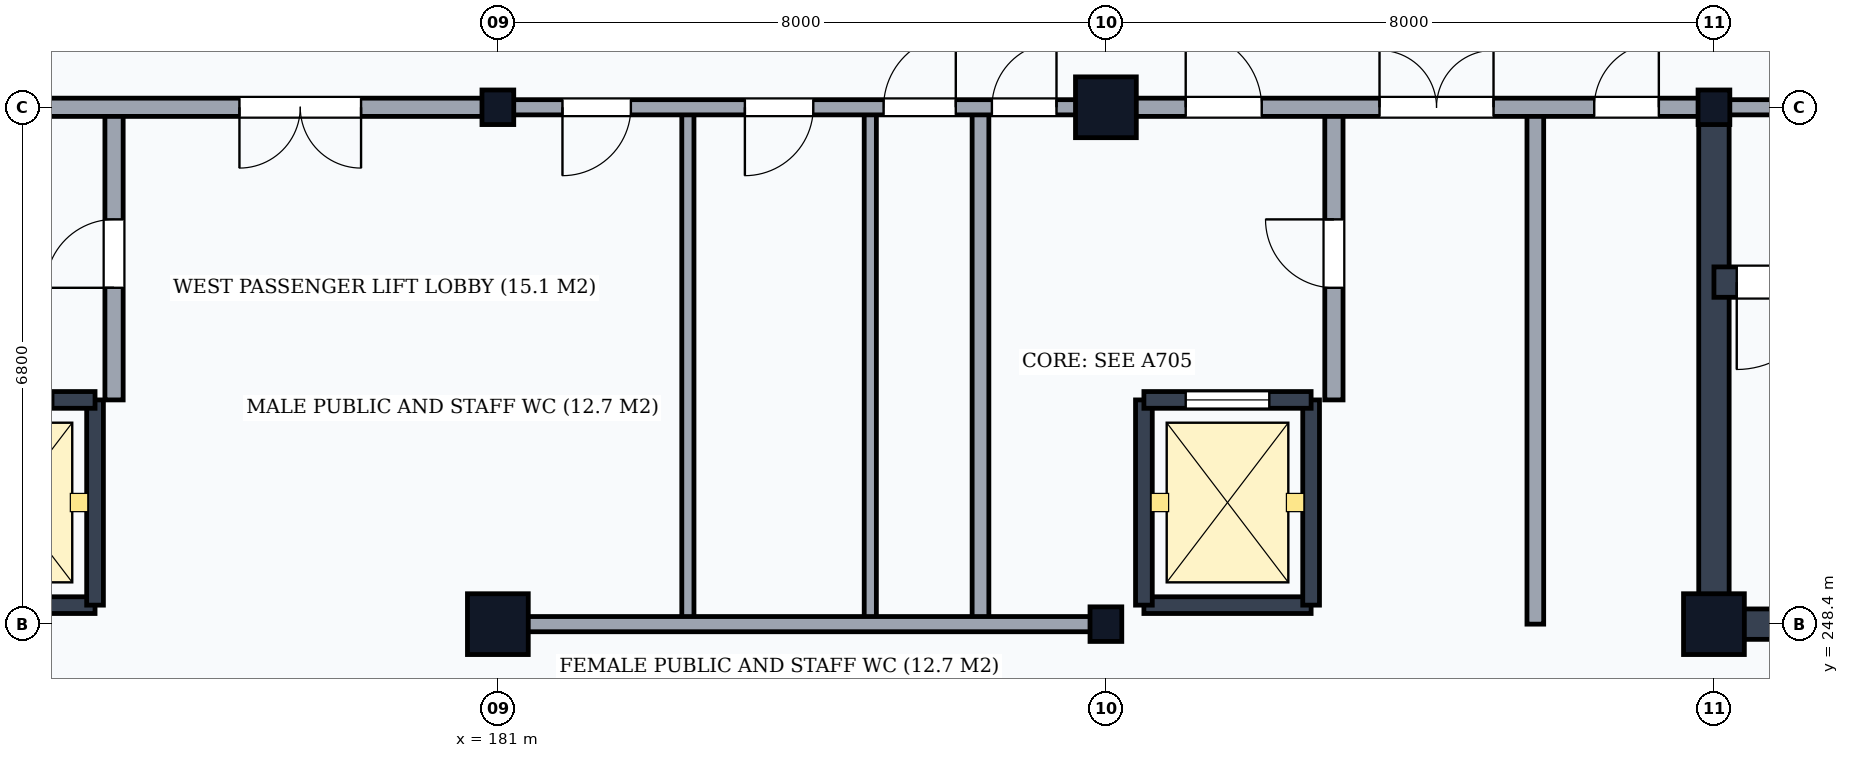
"""IFC4 building model, lengths in metres.
Left out: names, types, materials, properties, quantities, classifications, styles, units other than length and angle.
Written with IfcOpenShell. Run it as: python <this file> out.ifc"""

import sys

from ifc_helpers import new_model, si_unit, direction, frame, frame_2d, origin, origin_2d, place, context, subcontext, project, spatial, rectangle, i_section, extrude, element, fill, save


model = new_model("IFC4")
c1 = context("Model", 3, precision=1e-05, world=origin(), true_north=direction((0.0, 1.0)))
c2 = subcontext(c1, "Body", "Model", "MODEL_VIEW")
j1 = project(units=[si_unit("LENGTHUNIT", "METRE"), si_unit("PLANEANGLEUNIT", "RADIAN")], contexts=[c1])
p1 = place(None, origin())
s1 = spatial("IfcSite", under=j1, at=p1, CompositionType="ELEMENT")
p2 = place(p1, origin())
s2 = spatial("IfcBuilding", under=s1, at=p2, CompositionType="ELEMENT")
p3 = place(p2, frame((0.0, 0.0, -4.8)))
s3 = spatial("IfcBuildingStorey", under=s2, at=p3, CompositionType="ELEMENT", Elevation=-4.8)
p4 = place(p3, frame((181.0, 248.4, 0.0), z_axis=(0.0, 0.0, 1.0), x_axis=(1.0, 0.0, 0.0)))
e1 = element("IfcColumn", 1, at=p4, inside=s3, PredefinedType="COLUMN", context=c2, shape_type="SweptSolid", body=[
    extrude(rectangle(XDim=0.8, YDim=0.8, at=origin_2d()), origin(), (0.0, 0.0, 1.0), 4.8),
])
for number, where, z_axis, x_axis in (
    (2, (181.0, 255.2, 0.0), (0.0, 0.0, 1.0), (1.0, 0.0, 0.0)),
    (3, (189.0, 248.4, 0.0), (0.0, 0.0, 1.0), (1.0, 0.0, 0.0)),
):
    element("IfcColumn", number, at=place(p3, frame(where, z_axis=z_axis, x_axis=x_axis)), inside=s3, PredefinedType="COLUMN", context=c2, shape_type="SweptSolid", body=[
        extrude(i_section(OverallWidth=0.418, OverallDepth=0.455, WebThickness=0.042, FlangeThickness=0.068, FilletRadius=0.015, at=origin_2d()), origin(), (0.0, 0.0, 1.0), 4.8),
    ])
for number, where, z_axis, x_axis in (
    (4, (189.0, 255.2, 0.0), (0.0, 0.0, 1.0), (1.0, 0.0, 0.0)),
    (5, (197.0, 248.4, 0.0), (0.0, 0.0, 1.0), (1.0, 0.0, 0.0)),
):
    element("IfcColumn", number, at=place(p3, frame(where, z_axis=z_axis, x_axis=x_axis)), inside=s3, PredefinedType="COLUMN", context=c2, shape_type="SweptSolid", body=[
        extrude(rectangle(XDim=0.8, YDim=0.8, at=origin_2d()), origin(), (0.0, 0.0, 1.0), 4.8),
    ])
p5 = place(p3, frame((197.0, 255.2, 0.0), z_axis=(0.0, 0.0, 1.0), x_axis=(1.0, 0.0, 0.0)))
e6 = element("IfcColumn", 6, at=p5, inside=s3, PredefinedType="COLUMN", context=c2, shape_type="SweptSolid", body=[
    extrude(i_section(OverallWidth=0.418, OverallDepth=0.455, WebThickness=0.042, FlangeThickness=0.068, FilletRadius=0.015, at=origin_2d()), origin(), (0.0, 0.0, 1.0), 4.8),
])
p6 = place(p3, frame((197.0, 248.4, 0.0), z_axis=(0.0, 0.0, 1.0), x_axis=(1.0, 0.0, 0.0)))
e7 = element("IfcWall", 7, at=p6, inside=s3, PredefinedType="SHEAR", context=c2, shape_type="SweptSolid", body=[
    extrude(rectangle(XDim=8.0, YDim=0.4, at=frame_2d((4.0, 0.0))), origin(), (0.0, 0.0, 1.0), 4.51),
])
p7 = place(p3, frame((197.0, 248.4, 0.0), z_axis=(0.0, 0.0, 1.0), x_axis=(0.0, 1.0, 0.0)))
e8 = element("IfcWall", 8, at=p7, inside=s3, PredefinedType="SHEAR", context=c2, shape_type="SweptSolid", body=[
    extrude(rectangle(XDim=6.8, YDim=0.4, at=frame_2d((3.4, 0.0))), origin(), (0.0, 0.0, 1.0), 4.51),
])
p8 = place(p3, frame((197.0, 252.9, 0.0), z_axis=(0.0, 0.0, 1.0), x_axis=(1.0, 0.0, 0.0)))
e9 = element("IfcWall", 9, at=p8, inside=s3, PredefinedType="SHEAR", context=c2, shape_type="SweptSolid", body=[
    extrude(rectangle(XDim=8.0, YDim=0.4, at=frame_2d((4.0, 0.0))), origin(), (0.0, 0.0, 1.0), 4.51),
])
p9 = place(p8, frame((0.3, 0.0, 0.0)))
e10 = element("IfcOpeningElement", 10, at=p9, cuts=e9, PredefinedType="OPENING", context=c2, shape_type="SweptSolid", body=[
    extrude(rectangle(XDim=1.15, YDim=2.15, at=frame_2d((0.575, 1.075))), frame((0.0, 0.215, 0.0), z_axis=(0.0, -1.0, 0.0), x_axis=(1.0, 0.0, 0.0)), (0.0, 0.0, 1.0), 0.43),
])
p10 = place(p3, frame((197.0, 255.2, 0.0), z_axis=(0.0, 0.0, 1.0), x_axis=(1.0, 0.0, 0.0)))
e11 = element("IfcWall", 11, at=p10, inside=s3, PredefinedType="PARTITIONING", context=c2, shape_type="SweptSolid", body=[
    extrude(rectangle(XDim=8.0, YDim=0.2, at=frame_2d((4.0, 0.0))), origin(), (0.0, 0.0, 1.0), 3.858),
])
p11 = place(p10, frame((3.275, 0.0, 0.0)))
e12 = element("IfcOpeningElement", 12, at=p11, cuts=e11, PredefinedType="OPENING", context=c2, shape_type="SweptSolid", body=[
    extrude(rectangle(XDim=1.45, YDim=2.2, at=frame_2d((0.725, 1.1))), frame((0.0, 0.115, 0.0), z_axis=(0.0, -1.0, 0.0), x_axis=(1.0, 0.0, 0.0)), (0.0, 0.0, 1.0), 0.23),
])
p12 = place(p3, frame((173.5, 248.65, 0.0), z_axis=(0.0, 0.0, 1.0), x_axis=(1.0, 0.0, 0.0)))
e13 = element("IfcWall", 13, at=p12, inside=s3, PredefinedType="SHEAR", context=c2, shape_type="SweptSolid", body=[
    extrude(rectangle(XDim=2.2, YDim=0.22, at=frame_2d((1.1, 0.0))), origin(), (0.0, 0.0, 1.0), 4.51),
])
p13 = place(p3, frame((175.7, 248.65, 0.0), z_axis=(0.0, 0.0, 1.0), x_axis=(0.0, 1.0, 0.0)))
e14 = element("IfcWall", 14, at=p13, inside=s3, PredefinedType="SHEAR", context=c2, shape_type="SweptSolid", body=[
    extrude(rectangle(XDim=2.7, YDim=0.22, at=frame_2d((1.35, 0.0))), origin(), (0.0, 0.0, 1.0), 4.51),
])
p14 = place(p3, frame((173.5, 251.35, 0.0), z_axis=(0.0, 0.0, 1.0), x_axis=(1.0, 0.0, 0.0)))
e15 = element("IfcWall", 15, at=p14, inside=s3, PredefinedType="SHEAR", context=c2, shape_type="SweptSolid", body=[
    extrude(rectangle(XDim=2.2, YDim=0.22, at=frame_2d((1.1, 0.0))), origin(), (0.0, 0.0, 1.0), 4.51),
])
p15 = place(p14, frame((0.55, 0.0, 0.0)))
e16 = element("IfcOpeningElement", 16, at=p15, cuts=e15, PredefinedType="OPENING", context=c2, shape_type="SweptSolid", body=[
    extrude(rectangle(XDim=1.1, YDim=2.15, at=frame_2d((0.55, 1.075))), frame((0.0, 0.125, 0.0), z_axis=(0.0, -1.0, 0.0), x_axis=(1.0, 0.0, 0.0)), (0.0, 0.0, 1.0), 0.25),
])
p16 = place(p3, frame((189.5, 248.65, 0.0), z_axis=(0.0, 0.0, 1.0), x_axis=(1.0, 0.0, 0.0)))
e17 = element("IfcWall", 17, at=p16, inside=s3, PredefinedType="SHEAR", context=c2, shape_type="SweptSolid", body=[
    extrude(rectangle(XDim=2.2, YDim=0.22, at=frame_2d((1.1, 0.0))), origin(), (0.0, 0.0, 1.0), 4.51),
])
for number, where, z_axis, x_axis in (
    (18, (189.5, 248.65, 0.0), (0.0, 0.0, 1.0), (0.0, 1.0, 0.0)),
    (19, (191.7, 248.65, 0.0), (0.0, 0.0, 1.0), (0.0, 1.0, 0.0)),
):
    element("IfcWall", number, at=place(p3, frame(where, z_axis=z_axis, x_axis=x_axis)), inside=s3, PredefinedType="SHEAR", context=c2, shape_type="SweptSolid", body=[
        extrude(rectangle(XDim=2.7, YDim=0.22, at=frame_2d((1.35, 0.0))), origin(), (0.0, 0.0, 1.0), 4.51),
    ])
p17 = place(p3, frame((189.5, 251.35, 0.0), z_axis=(0.0, 0.0, 1.0), x_axis=(1.0, 0.0, 0.0)))
e20 = element("IfcWall", 20, at=p17, inside=s3, PredefinedType="SHEAR", context=c2, shape_type="SweptSolid", body=[
    extrude(rectangle(XDim=2.2, YDim=0.22, at=frame_2d((1.1, 0.0))), origin(), (0.0, 0.0, 1.0), 4.51),
])
p18 = place(p17, frame((0.55, 0.0, 0.0)))
e21 = element("IfcOpeningElement", 21, at=p18, cuts=e20, PredefinedType="OPENING", context=c2, shape_type="SweptSolid", body=[
    extrude(rectangle(XDim=1.1, YDim=2.15, at=frame_2d((0.55, 1.075))), frame((0.0, 0.125, 0.0), z_axis=(0.0, -1.0, 0.0), x_axis=(1.0, 0.0, 0.0)), (0.0, 0.0, 1.0), 0.25),
])
p19 = place(p3, frame((175.95, 251.35, 0.0), z_axis=(0.0, 0.0, 1.0), x_axis=(0.0, 1.0, 0.0)))
e22 = element("IfcWall", 22, at=p19, inside=s3, PredefinedType="PARTITIONING", context=c2, shape_type="SweptSolid", body=[
    extrude(rectangle(XDim=3.85, YDim=0.24, at=frame_2d((1.925, 0.0))), origin(), (0.0, 0.0, 1.0), 4.51),
])
p20 = place(p19, frame((1.475, 0.0, 0.0)))
e23 = element("IfcOpeningElement", 23, at=p20, cuts=e22, PredefinedType="OPENING", context=c2, shape_type="SweptSolid", body=[
    extrude(rectangle(XDim=0.9, YDim=2.1, at=frame_2d((0.45, 1.05))), frame((0.0, 0.135, 0.0), z_axis=(0.0, -1.0, 0.0), x_axis=(1.0, 0.0, 0.0)), (0.0, 0.0, 1.0), 0.27),
])
p21 = place(p3, frame((192.0, 251.35, 0.0), z_axis=(0.0, 0.0, 1.0), x_axis=(0.0, 1.0, 0.0)))
e24 = element("IfcWall", 24, at=p21, inside=s3, PredefinedType="PARTITIONING", context=c2, shape_type="SweptSolid", body=[
    extrude(rectangle(XDim=3.85, YDim=0.24, at=frame_2d((1.925, 0.0))), origin(), (0.0, 0.0, 1.0), 4.51),
])
p22 = place(p21, frame((1.475, 0.0, 0.0)))
e25 = element("IfcOpeningElement", 25, at=p22, cuts=e24, PredefinedType="OPENING", context=c2, shape_type="SweptSolid", body=[
    extrude(rectangle(XDim=0.9, YDim=2.1, at=frame_2d((0.45, 1.05))), frame((0.0, 0.135, 0.0), z_axis=(0.0, -1.0, 0.0), x_axis=(1.0, 0.0, 0.0)), (0.0, 0.0, 1.0), 0.27),
])
p23 = place(p3, frame((194.65, 248.4, 0.0), z_axis=(0.0, 0.0, 1.0), x_axis=(0.0, 1.0, 0.0)))
e26 = element("IfcWall", 26, at=p23, inside=s3, PredefinedType="PARTITIONING", context=c2, shape_type="SweptSolid", body=[
    extrude(rectangle(XDim=6.8, YDim=0.22, at=frame_2d((3.4, 0.0))), origin(), (0.0, 0.0, 1.0), 4.51),
])
for number, where, z_axis, x_axis in (
    (27, (183.5, 248.4, 0.0), (0.0, 0.0, 1.0), (0.0, 1.0, 0.0)),
    (28, (185.9, 248.4, 0.0), (0.0, 0.0, 1.0), (0.0, 1.0, 0.0)),
):
    element("IfcWall", number, at=place(p3, frame(where, z_axis=z_axis, x_axis=x_axis)), inside=s3, PredefinedType="PARTITIONING", context=c2, shape_type="SweptSolid", body=[
        extrude(rectangle(XDim=6.8, YDim=0.16, at=frame_2d((3.4, 0.0))), origin(), (0.0, 0.0, 1.0), 4.51),
    ])
p24 = place(p3, frame((187.35, 248.4, 0.0), z_axis=(0.0, 0.0, 1.0), x_axis=(0.0, 1.0, 0.0)))
e29 = element("IfcWall", 29, at=p24, inside=s3, PredefinedType="PARTITIONING", context=c2, shape_type="SweptSolid", body=[
    extrude(rectangle(XDim=6.8, YDim=0.22, at=frame_2d((3.4, 0.0))), origin(), (0.0, 0.0, 1.0), 4.51),
])
p25 = place(p3, frame((181.0, 248.4, 0.0), z_axis=(0.0, 0.0, 1.0), x_axis=(1.0, 0.0, 0.0)))
e30 = element("IfcWall", 30, at=p25, inside=s3, PredefinedType="PARTITIONING", context=c2, shape_type="SweptSolid", body=[
    extrude(rectangle(XDim=8.0, YDim=0.2, at=frame_2d((4.0, 0.0))), origin(), (0.0, 0.0, 1.0), 3.858),
])
p26 = place(p3, frame((173.0, 255.2, 0.0), z_axis=(0.0, 0.0, 1.0), x_axis=(1.0, 0.0, 0.0)))
e31 = element("IfcWall", 31, at=p26, inside=s3, PredefinedType="PARTITIONING", context=c2, shape_type="SweptSolid", body=[
    extrude(rectangle(XDim=8.0, YDim=0.24, at=frame_2d((4.0, 0.0))), origin(), (0.0, 0.0, 1.0), 3.858),
])
p27 = place(p26, frame((1.05, 0.0, 0.0)))
e32 = element("IfcOpeningElement", 32, at=p27, cuts=e31, PredefinedType="OPENING", context=c2, shape_type="SweptSolid", body=[
    extrude(rectangle(XDim=1.0, YDim=2.1, at=frame_2d((0.5, 1.05))), frame((0.0, 0.135, 0.0), z_axis=(0.0, -1.0, 0.0), x_axis=(1.0, 0.0, 0.0)), (0.0, 0.0, 1.0), 0.27),
])
p28 = place(p26, frame((4.6, 0.0, 0.0)))
e33 = element("IfcOpeningElement", 33, at=p28, cuts=e31, PredefinedType="OPENING", context=c2, shape_type="SweptSolid", body=[
    extrude(rectangle(XDim=1.6, YDim=2.25, at=frame_2d((0.8, 1.125))), frame((0.0, 0.135, 0.0), z_axis=(0.0, -1.0, 0.0), x_axis=(1.0, 0.0, 0.0)), (0.0, 0.0, 1.0), 0.27),
])
p29 = place(p3, frame((181.0, 255.2, 0.0), z_axis=(0.0, 0.0, 1.0), x_axis=(1.0, 0.0, 0.0)))
e34 = element("IfcWall", 34, at=p29, inside=s3, PredefinedType="PARTITIONING", context=c2, shape_type="SweptSolid", body=[
    extrude(rectangle(XDim=8.0, YDim=0.2, at=frame_2d((4.0, 0.0))), origin(), (0.0, 0.0, 1.0), 3.858),
])
p30 = place(p29, frame((0.85, 0.0, 0.0)))
e35 = element("IfcOpeningElement", 35, at=p30, cuts=e34, PredefinedType="OPENING", context=c2, shape_type="SweptSolid", body=[
    extrude(rectangle(XDim=0.9, YDim=2.1, at=frame_2d((0.45, 1.05))), frame((0.0, 0.115, 0.0), z_axis=(0.0, -1.0, 0.0), x_axis=(1.0, 0.0, 0.0)), (0.0, 0.0, 1.0), 0.23),
])
p31 = place(p29, frame((3.25, 0.0, 0.0)))
e36 = element("IfcOpeningElement", 36, at=p31, cuts=e34, PredefinedType="OPENING", context=c2, shape_type="SweptSolid", body=[
    extrude(rectangle(XDim=0.9, YDim=2.1, at=frame_2d((0.45, 1.05))), frame((0.0, 0.115, 0.0), z_axis=(0.0, -1.0, 0.0), x_axis=(1.0, 0.0, 0.0)), (0.0, 0.0, 1.0), 0.23),
])
p32 = place(p29, frame((5.075, 0.0, 0.0)))
e37 = element("IfcOpeningElement", 37, at=p32, cuts=e34, PredefinedType="OPENING", context=c2, shape_type="SweptSolid", body=[
    extrude(rectangle(XDim=0.95, YDim=2.1, at=frame_2d((0.475, 1.05))), frame((0.0, 0.115, 0.0), z_axis=(0.0, -1.0, 0.0), x_axis=(1.0, 0.0, 0.0)), (0.0, 0.0, 1.0), 0.23),
])
p33 = place(p29, frame((6.5, 0.0, 0.0)))
e38 = element("IfcOpeningElement", 38, at=p33, cuts=e34, PredefinedType="OPENING", context=c2, shape_type="SweptSolid", body=[
    extrude(rectangle(XDim=0.85, YDim=2.1, at=frame_2d((0.425, 1.05))), frame((0.0, 0.115, 0.0), z_axis=(0.0, -1.0, 0.0), x_axis=(1.0, 0.0, 0.0)), (0.0, 0.0, 1.0), 0.23),
])
p34 = place(p3, frame((189.0, 255.2, 0.0), z_axis=(0.0, 0.0, 1.0), x_axis=(1.0, 0.0, 0.0)))
e39 = element("IfcWall", 39, at=p34, inside=s3, PredefinedType="PARTITIONING", context=c2, shape_type="SweptSolid", body=[
    extrude(rectangle(XDim=8.0, YDim=0.24, at=frame_2d((4.0, 0.0))), origin(), (0.0, 0.0, 1.0), 3.858),
])
p35 = place(p34, frame((1.05, 0.0, 0.0)))
e40 = element("IfcOpeningElement", 40, at=p35, cuts=e39, PredefinedType="OPENING", context=c2, shape_type="SweptSolid", body=[
    extrude(rectangle(XDim=1.0, YDim=2.1, at=frame_2d((0.5, 1.05))), frame((0.0, 0.135, 0.0), z_axis=(0.0, -1.0, 0.0), x_axis=(1.0, 0.0, 0.0)), (0.0, 0.0, 1.0), 0.27),
])
p36 = place(p34, frame((3.6, 0.0, 0.0)))
e41 = element("IfcOpeningElement", 41, at=p36, cuts=e39, PredefinedType="OPENING", context=c2, shape_type="SweptSolid", body=[
    extrude(rectangle(XDim=1.5, YDim=2.25, at=frame_2d((0.75, 1.125))), frame((0.0, 0.135, 0.0), z_axis=(0.0, -1.0, 0.0), x_axis=(1.0, 0.0, 0.0)), (0.0, 0.0, 1.0), 0.27),
])
p37 = place(p34, frame((6.425, 0.0, 0.0)))
e42 = element("IfcOpeningElement", 42, at=p37, cuts=e39, PredefinedType="OPENING", context=c2, shape_type="SweptSolid", body=[
    extrude(rectangle(XDim=0.85, YDim=2.1, at=frame_2d((0.425, 1.05))), frame((0.0, 0.135, 0.0), z_axis=(0.0, -1.0, 0.0), x_axis=(1.0, 0.0, 0.0)), (0.0, 0.0, 1.0), 0.27),
])
p38 = place(p9, frame((1.15, 0.0, 0.0), z_axis=(0.0, 0.0, 1.0), x_axis=(-1.0, 0.0, 0.0)))
e43 = element("IfcDoor", 43, at=p38, inside=s3, OperationType="SINGLE_SWING_RIGHT", PredefinedType="DOOR", context=c2, shape_type="SweptSolid", body=[
    extrude(rectangle(XDim=1.15, YDim=2.15, at=frame_2d((0.575, 1.075))), frame((0.0, 0.025, 0.0), z_axis=(0.0, -1.0, 0.0), x_axis=(1.0, 0.0, 0.0)), (0.0, 0.0, 1.0), 0.05),
])
fill(e10, e43)
p39 = place(p15, origin())
e44 = element("IfcDoor", 44, at=p39, inside=s3, OperationType="DOUBLE_DOOR_SLIDING", PredefinedType="USERDEFINED", context=c2, shape_type="SweptSolid", body=[
    extrude(rectangle(XDim=1.1, YDim=2.15, at=frame_2d((0.55, 1.075))), frame((0.0, 0.025, 0.0), z_axis=(0.0, -1.0, 0.0), x_axis=(1.0, 0.0, 0.0)), (0.0, 0.0, 1.0), 0.05),
])
fill(e16, e44)
p40 = place(p18, origin())
e45 = element("IfcDoor", 45, at=p40, inside=s3, OperationType="DOUBLE_DOOR_SLIDING", PredefinedType="USERDEFINED", context=c2, shape_type="SweptSolid", body=[
    extrude(rectangle(XDim=1.1, YDim=2.15, at=frame_2d((0.55, 1.075))), frame((0.0, 0.025, 0.0), z_axis=(0.0, -1.0, 0.0), x_axis=(1.0, 0.0, 0.0)), (0.0, 0.0, 1.0), 0.05),
])
fill(e21, e45)
p41 = place(p20, origin())
e46 = element("IfcDoor", 46, at=p41, inside=s3, OperationType="SINGLE_SWING_LEFT", PredefinedType="DOOR", context=c2, shape_type="SweptSolid", body=[
    extrude(rectangle(XDim=0.9, YDim=2.1, at=frame_2d((0.45, 1.05))), frame((0.0, 0.025, 0.0), z_axis=(0.0, -1.0, 0.0), x_axis=(1.0, 0.0, 0.0)), (0.0, 0.0, 1.0), 0.05),
])
fill(e23, e46)
p42 = place(p22, frame((0.9, 0.0, 0.0), z_axis=(0.0, 0.0, 1.0), x_axis=(-1.0, 0.0, 0.0)))
e47 = element("IfcDoor", 47, at=p42, inside=s3, OperationType="SINGLE_SWING_LEFT", PredefinedType="DOOR", context=c2, shape_type="SweptSolid", body=[
    extrude(rectangle(XDim=0.9, YDim=2.1, at=frame_2d((0.45, 1.05))), frame((0.0, 0.025, 0.0), z_axis=(0.0, -1.0, 0.0), x_axis=(1.0, 0.0, 0.0)), (0.0, 0.0, 1.0), 0.05),
])
fill(e25, e47)
p43 = place(p28, frame((1.6, 0.0, 0.0), z_axis=(0.0, 0.0, 1.0), x_axis=(-1.0, 0.0, 0.0)))
e48 = element("IfcDoor", 48, at=p43, inside=s3, OperationType="DOUBLE_DOOR_SINGLE_SWING", PredefinedType="DOOR", context=c2, shape_type="SweptSolid", body=[
    extrude(rectangle(XDim=1.6, YDim=2.25, at=frame_2d((0.8, 1.125))), frame((0.0, 0.025, 0.0), z_axis=(0.0, -1.0, 0.0), x_axis=(1.0, 0.0, 0.0)), (0.0, 0.0, 1.0), 0.05),
])
fill(e33, e48)
p44 = place(p30, frame((0.9, 0.0, 0.0), z_axis=(0.0, 0.0, 1.0), x_axis=(-1.0, 0.0, 0.0)))
e49 = element("IfcDoor", 49, at=p44, inside=s3, OperationType="SINGLE_SWING_RIGHT", PredefinedType="DOOR", context=c2, shape_type="SweptSolid", body=[
    extrude(rectangle(XDim=0.9, YDim=2.1, at=frame_2d((0.45, 1.05))), frame((0.0, 0.025, 0.0), z_axis=(0.0, -1.0, 0.0), x_axis=(1.0, 0.0, 0.0)), (0.0, 0.0, 1.0), 0.05),
])
fill(e35, e49)
p45 = place(p31, frame((0.9, 0.0, 0.0), z_axis=(0.0, 0.0, 1.0), x_axis=(-1.0, 0.0, 0.0)))
e50 = element("IfcDoor", 50, at=p45, inside=s3, OperationType="SINGLE_SWING_RIGHT", PredefinedType="DOOR", context=c2, shape_type="SweptSolid", body=[
    extrude(rectangle(XDim=0.9, YDim=2.1, at=frame_2d((0.45, 1.05))), frame((0.0, 0.025, 0.0), z_axis=(0.0, -1.0, 0.0), x_axis=(1.0, 0.0, 0.0)), (0.0, 0.0, 1.0), 0.05),
])
fill(e36, e50)
p46 = place(p32, frame((0.95, 0.0, 0.0), z_axis=(0.0, 0.0, 1.0), x_axis=(-1.0, 0.0, 0.0)))
e51 = element("IfcDoor", 51, at=p46, inside=s3, OperationType="SINGLE_SWING_LEFT", PredefinedType="DOOR", context=c2, shape_type="SweptSolid", body=[
    extrude(rectangle(XDim=0.95, YDim=2.1, at=frame_2d((0.475, 1.05))), frame((0.0, 0.025, 0.0), z_axis=(0.0, -1.0, 0.0), x_axis=(1.0, 0.0, 0.0)), (0.0, 0.0, 1.0), 0.05),
])
fill(e37, e51)
p47 = place(p33, frame((0.85, 0.0, 0.0), z_axis=(0.0, 0.0, 1.0), x_axis=(-1.0, 0.0, 0.0)))
e52 = element("IfcDoor", 52, at=p47, inside=s3, OperationType="SINGLE_SWING_LEFT", PredefinedType="DOOR", context=c2, shape_type="SweptSolid", body=[
    extrude(rectangle(XDim=0.85, YDim=2.1, at=frame_2d((0.425, 1.05))), frame((0.0, 0.025, 0.0), z_axis=(0.0, -1.0, 0.0), x_axis=(1.0, 0.0, 0.0)), (0.0, 0.0, 1.0), 0.05),
])
fill(e38, e52)
p48 = place(p35, origin())
e53 = element("IfcDoor", 53, at=p48, inside=s3, OperationType="SINGLE_SWING_LEFT", PredefinedType="DOOR", context=c2, shape_type="SweptSolid", body=[
    extrude(rectangle(XDim=1.0, YDim=2.1, at=frame_2d((0.5, 1.05))), frame((0.0, 0.025, 0.0), z_axis=(0.0, -1.0, 0.0), x_axis=(1.0, 0.0, 0.0)), (0.0, 0.0, 1.0), 0.05),
])
fill(e40, e53)
p49 = place(p36, origin())
e54 = element("IfcDoor", 54, at=p49, inside=s3, OperationType="DOUBLE_DOOR_SINGLE_SWING", PredefinedType="DOOR", context=c2, shape_type="SweptSolid", body=[
    extrude(rectangle(XDim=1.5, YDim=2.25, at=frame_2d((0.75, 1.125))), frame((0.0, 0.025, 0.0), z_axis=(0.0, -1.0, 0.0), x_axis=(1.0, 0.0, 0.0)), (0.0, 0.0, 1.0), 0.05),
])
fill(e41, e54)
p50 = place(p37, frame((0.85, 0.0, 0.0), z_axis=(0.0, 0.0, 1.0), x_axis=(-1.0, 0.0, 0.0)))
e55 = element("IfcDoor", 55, at=p50, inside=s3, OperationType="SINGLE_SWING_LEFT", PredefinedType="DOOR", context=c2, shape_type="SweptSolid", body=[
    extrude(rectangle(XDim=0.85, YDim=2.1, at=frame_2d((0.425, 1.05))), frame((0.0, 0.025, 0.0), z_axis=(0.0, -1.0, 0.0), x_axis=(1.0, 0.0, 0.0)), (0.0, 0.0, 1.0), 0.05),
])
fill(e42, e55)
save(model, sys.argv[1])
